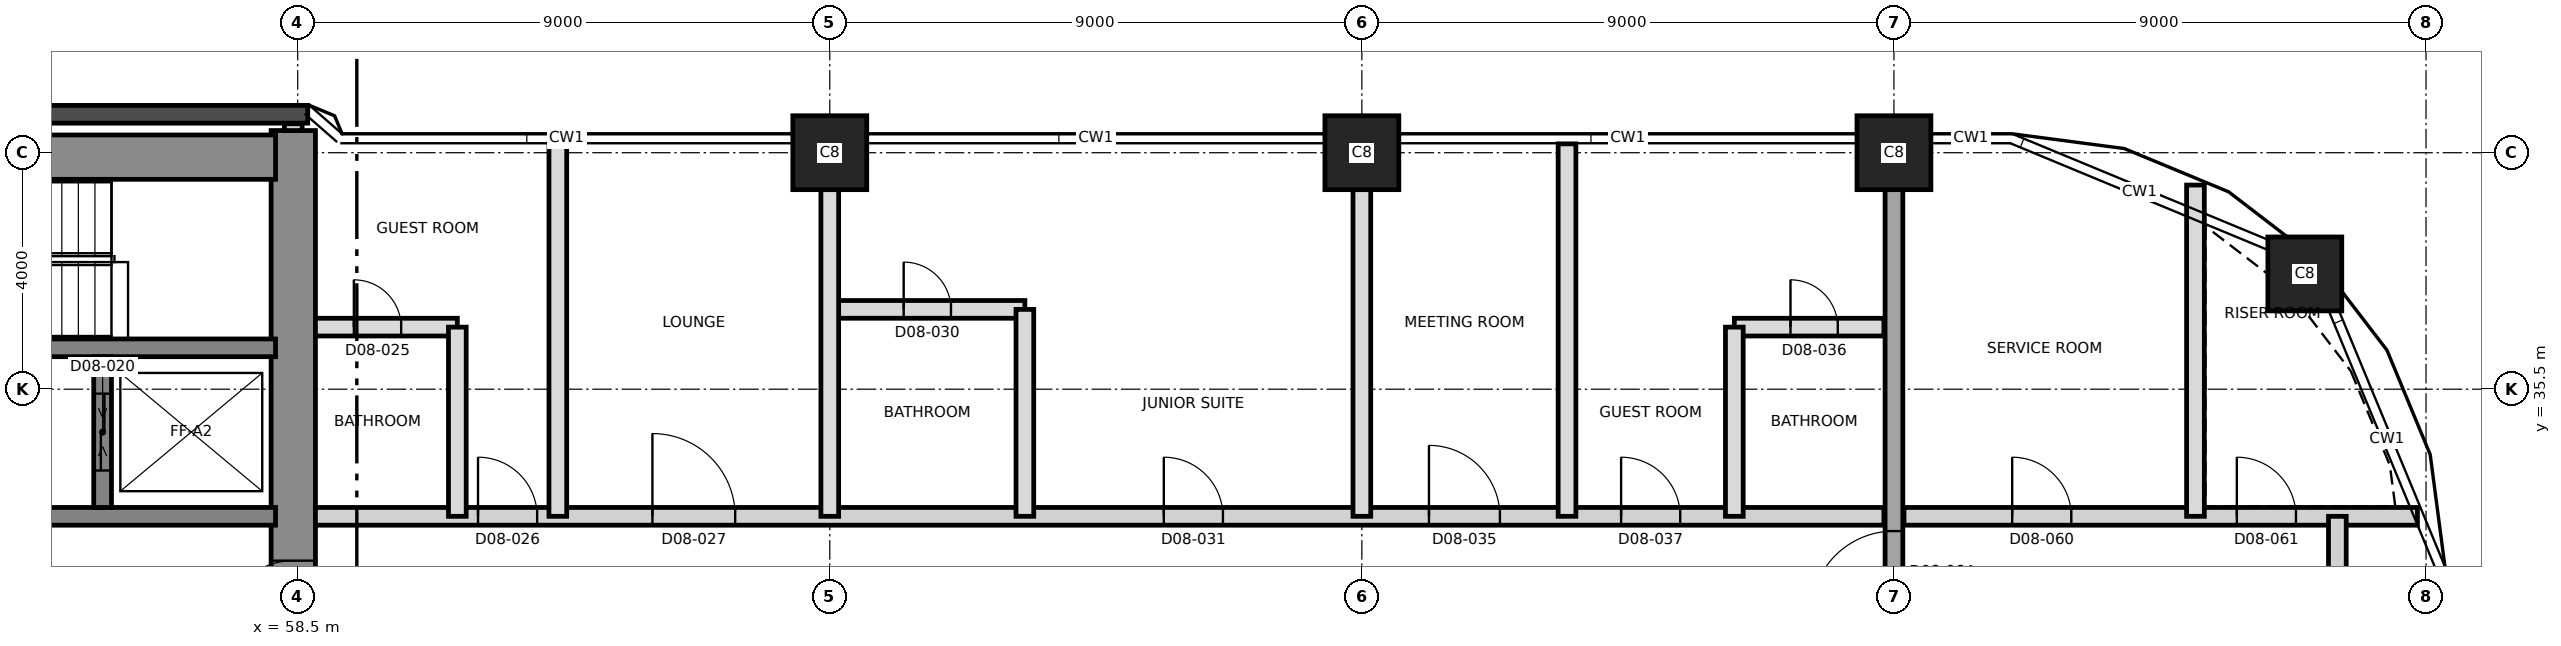
"""IFC4 building model, lengths in metres.
Left out: names, types, materials, properties, quantities, classifications, styles, units other than length and angle.
Written with IfcOpenShell. Run it as: python <this file> out.ifc"""

import sys

from ifc_helpers import new_model, si_unit, direction, frame, frame_2d, origin, origin_2d, place, context, subcontext, project, spatial, rectangle, extrude, element, fill, save


model = new_model("IFC4")
c1 = context("Model", 3, precision=1e-05, world=origin(), true_north=direction((0.0, 1.0)))
c2 = subcontext(c1, "Body", "Model", "MODEL_VIEW")
j1 = project(units=[si_unit("LENGTHUNIT", "METRE"), si_unit("PLANEANGLEUNIT", "RADIAN")], contexts=[c1])
p1 = place(None, origin())
s1 = spatial("IfcSite", under=j1, at=p1, CompositionType="ELEMENT")
p2 = place(p1, origin())
s2 = spatial("IfcBuilding", under=s1, at=p2, CompositionType="ELEMENT")
p3 = place(p2, frame((0.0, 0.0, 98.2)))
s3 = spatial("IfcBuildingStorey", under=s2, at=p3, CompositionType="ELEMENT", Elevation=98.2)
p4 = place(p3, frame((58.425, 21.125, 0.0), z_axis=(0.0, 0.0, 1.0), x_axis=(0.0, 1.0, 0.0)))
e1 = element("IfcWall", 1, at=p4, inside=s3, PredefinedType="SHEAR", context=c2, shape_type="SweptSolid", body=[
    extrude(rectangle(XDim=18.75, YDim=0.75, at=frame_2d((9.375, 0.0))), origin(), (0.0, 0.0, 1.0), 3.7),
])
p5 = place(p4, frame((10.275, 0.0, 0.0)))
e2 = element("IfcOpeningElement", 2, at=p5, cuts=e1, PredefinedType="OPENING", context=c2, shape_type="SweptSolid", body=[
    extrude(rectangle(XDim=1.2, YDim=2.1, at=frame_2d((0.6, 1.05))), frame((0.0, 0.385, 0.0), z_axis=(0.0, -1.0, 0.0), x_axis=(1.0, 0.0, 0.0)), (0.0, 0.0, 1.0), 0.77),
])
p6 = place(p3, frame((31.125, 39.425, 0.0), z_axis=(0.0, 0.0, 1.0), x_axis=(1.0, 0.0, 0.0)))
e3 = element("IfcWall", 3, at=p6, inside=s3, PredefinedType="SHEAR", context=c2, shape_type="SweptSolid", body=[
    extrude(rectangle(XDim=27.0, YDim=0.75, at=frame_2d((13.5, 0.0))), origin(), (0.0, 0.0, 1.0), 3.7),
])
p7 = place(p6, frame((10.575, 0.0, 0.0)))
e4 = element("IfcOpeningElement", 4, at=p7, cuts=e3, PredefinedType="OPENING", context=c2, shape_type="SweptSolid", body=[
    extrude(rectangle(XDim=1.2, YDim=2.1, at=frame_2d((0.6, 1.05))), frame((0.0, 0.385, 0.0), z_axis=(0.0, -1.0, 0.0), x_axis=(1.0, 0.0, 0.0)), (0.0, 0.0, 1.0), 0.77),
])
p8 = place(p3, frame((31.875, 33.35, 0.0), z_axis=(0.0, 0.0, 1.0), x_axis=(1.0, 0.0, 0.0)))
e5 = element("IfcWall", 5, at=p8, inside=s3, PredefinedType="SHEAR", context=c2, shape_type="SweptSolid", body=[
    extrude(rectangle(XDim=26.25, YDim=0.3, at=frame_2d((13.125, 0.0))), origin(), (0.0, 0.0, 1.0), 3.7),
])
p9 = place(p8, frame((13.775, 0.0, 0.0)))
e6 = element("IfcOpeningElement", 6, at=p9, cuts=e5, PredefinedType="OPENING", context=c2, shape_type="SweptSolid", body=[
    extrude(rectangle(XDim=1.4, YDim=2.1, at=frame_2d((0.7, 1.05))), frame((0.0, 0.16, 0.0), z_axis=(0.0, -1.0, 0.0), x_axis=(1.0, 0.0, 0.0)), (0.0, 0.0, 1.0), 0.32),
])
p10 = place(p8, frame((5.25, 0.0, 0.0)))
e7 = element("IfcOpeningElement", 7, at=p10, cuts=e5, PredefinedType="OPENING", context=c2, shape_type="SweptSolid", body=[
    extrude(rectangle(XDim=1.2, YDim=2.1, at=frame_2d((0.6, 1.05))), frame((0.0, 0.16, 0.0), z_axis=(0.0, -1.0, 0.0), x_axis=(1.0, 0.0, 0.0)), (0.0, 0.0, 1.0), 0.32),
])
p11 = place(p8, frame((19.8, 0.0, 0.0)))
e8 = element("IfcOpeningElement", 8, at=p11, cuts=e5, PredefinedType="OPENING", context=c2, shape_type="SweptSolid", body=[
    extrude(rectangle(XDim=1.2, YDim=2.1, at=frame_2d((0.6, 1.05))), frame((0.0, 0.16, 0.0), z_axis=(0.0, -1.0, 0.0), x_axis=(1.0, 0.0, 0.0)), (0.0, 0.0, 1.0), 0.32),
])
p12 = place(p3, frame((43.5, 36.2, 0.0), z_axis=(0.0, 0.0, 1.0), x_axis=(1.0, 0.0, 0.0)))
e9 = element("IfcWall", 9, at=p12, inside=s3, PredefinedType="SHEAR", context=c2, shape_type="SweptSolid", body=[
    extrude(rectangle(XDim=14.625, YDim=0.3, at=frame_2d((7.312, 0.0))), origin(), (0.0, 0.0, 1.0), 3.7),
])
p13 = place(p12, frame((6.9, 0.0, 0.0)))
e10 = element("IfcOpeningElement", 10, at=p13, cuts=e9, PredefinedType="OPENING", context=c2, shape_type="SweptSolid", body=[
    extrude(rectangle(XDim=1.2, YDim=2.1, at=frame_2d((0.6, 1.05))), frame((0.0, 0.16, 0.0), z_axis=(0.0, -1.0, 0.0), x_axis=(1.0, 0.0, 0.0)), (0.0, 0.0, 1.0), 0.32),
])
p14 = place(p12, frame((0.7, 0.0, 0.0)))
e11 = element("IfcOpeningElement", 11, at=p14, cuts=e9, PredefinedType="OPENING", context=c2, shape_type="SweptSolid", body=[
    extrude(rectangle(XDim=1.3, YDim=2.4, at=frame_2d((0.65, 1.2))), frame((0.0, 0.16, 0.0), z_axis=(0.0, -1.0, 0.0), x_axis=(1.0, 0.0, 0.0)), (0.0, 0.0, 1.0), 0.32),
])
p15 = place(p12, frame((3.7, 0.0, 0.0)))
e12 = element("IfcOpeningElement", 12, at=p15, cuts=e9, PredefinedType="OPENING", context=c2, shape_type="SweptSolid", body=[
    extrude(rectangle(XDim=1.3, YDim=2.4, at=frame_2d((0.65, 1.2))), frame((0.0, 0.16, 0.0), z_axis=(0.0, -1.0, 0.0), x_axis=(1.0, 0.0, 0.0)), (0.0, 0.0, 1.0), 0.32),
])
p16 = place(p3, frame((55.2, 33.5, 0.0), z_axis=(0.0, 0.0, 1.0), x_axis=(0.0, 1.0, 0.0)))
e13 = element("IfcWall", 13, at=p16, inside=s3, PredefinedType="SHEAR", context=c2, shape_type="SweptSolid", body=[
    extrude(rectangle(XDim=2.55, YDim=0.3, at=frame_2d((1.275, 0.0))), origin(), (0.0, 0.0, 1.0), 3.7),
])
p17 = place(p16, frame((0.625, 0.0, 0.0)))
e14 = element("IfcOpeningElement", 14, at=p17, cuts=e13, PredefinedType="OPENING", context=c2, shape_type="SweptSolid", body=[
    extrude(rectangle(XDim=1.3, YDim=2.4, at=frame_2d((0.65, 1.2))), frame((0.0, 0.16, 0.0), z_axis=(0.0, -1.0, 0.0), x_axis=(1.0, 0.0, 0.0)), (0.0, 0.0, 1.0), 0.32),
])
for number, where, z_axis, x_axis in (
    (15, (92.45, 37.45, 0.0), (0.0, 0.0, 1.0), (1.0, 0.0, 0.0)),
    (16, (67.5, 39.5, 0.0), (0.0, 0.0, 1.0), (1.0, 0.0, 0.0)),
    (17, (76.5, 39.5, 0.0), (0.0, 0.0, 1.0), (1.0, 0.0, 0.0)),
    (18, (85.5, 39.5, 0.0), (0.0, 0.0, 1.0), (1.0, 0.0, 0.0)),
):
    element("IfcColumn", number, at=place(p3, frame(where, z_axis=z_axis, x_axis=x_axis)), inside=s3, PredefinedType="COLUMN", context=c2, shape_type="SweptSolid", body=[
        extrude(rectangle(XDim=1.25, YDim=1.25, at=origin_2d()), origin(), (0.0, 0.0, 1.0), 3.7),
    ])
p18 = place(p3, frame((85.5, 21.53, 0.0), z_axis=(0.0, 0.0, 1.0), x_axis=(0.0, 1.0, 0.0)))
e19 = element("IfcWall", 19, at=p18, inside=s3, PredefinedType="SHEAR", context=c2, shape_type="SweptSolid", body=[
    extrude(rectangle(XDim=17.94, YDim=0.3, at=frame_2d((8.97, 0.0))), origin(), (0.0, 0.0, 1.0), 3.7),
])
p19 = place(p18, frame((10.17, 0.0, 0.0)))
e20 = element("IfcOpeningElement", 20, at=p19, cuts=e19, PredefinedType="OPENING", context=c2, shape_type="SweptSolid", body=[
    extrude(rectangle(XDim=1.4, YDim=2.1, at=frame_2d((0.7, 1.05))), frame((0.0, 0.16, 0.0), z_axis=(0.0, -1.0, 0.0), x_axis=(1.0, 0.0, 0.0)), (0.0, 0.0, 1.0), 0.32),
])
p20 = place(p3, frame((58.67, 40.15, 0.0), z_axis=(0.0, 0.0, 1.0), x_axis=(-1.0, 0.0, 0.0)))
e21 = element("IfcWall", 21, at=p20, inside=s3, PredefinedType="SOLIDWALL", context=c2, shape_type="SweptSolid", body=[
    extrude(rectangle(XDim=5.341, YDim=0.3, at=frame_2d((2.67, 0.0))), origin(), (0.0, 0.0, 1.0), 3.4),
])
p21 = place(p3, frame((58.8, 33.35, 0.0), z_axis=(0.0, 0.0, 1.0), x_axis=(1.0, 0.0, 0.0)))
e22 = element("IfcWall", 22, at=p21, inside=s3, PredefinedType="PARTITIONING", context=c2, shape_type="SweptSolid", body=[
    extrude(rectangle(XDim=26.53, YDim=0.3, at=frame_2d((13.265, 0.0))), origin(), (0.0, 0.0, 1.0), 3.4),
])
p22 = place(p21, frame((2.75, 0.0, 0.0)))
e23 = element("IfcOpeningElement", 23, at=p22, cuts=e22, PredefinedType="OPENING", context=c2, shape_type="SweptSolid", body=[
    extrude(rectangle(XDim=1.0, YDim=2.1, at=frame_2d((0.5, 1.05))), frame((0.0, 0.16, 0.0), z_axis=(0.0, -1.0, 0.0), x_axis=(1.0, 0.0, 0.0)), (0.0, 0.0, 1.0), 0.32),
])
p23 = place(p21, frame((5.7, 0.0, 0.0)))
e24 = element("IfcOpeningElement", 24, at=p23, cuts=e22, PredefinedType="OPENING", context=c2, shape_type="SweptSolid", body=[
    extrude(rectangle(XDim=1.4, YDim=2.1, at=frame_2d((0.7, 1.05))), frame((0.0, 0.16, 0.0), z_axis=(0.0, -1.0, 0.0), x_axis=(1.0, 0.0, 0.0)), (0.0, 0.0, 1.0), 0.32),
])
p24 = place(p21, frame((14.35, 0.0, 0.0)))
e25 = element("IfcOpeningElement", 25, at=p24, cuts=e22, PredefinedType="OPENING", context=c2, shape_type="SweptSolid", body=[
    extrude(rectangle(XDim=1.0, YDim=2.4, at=frame_2d((0.5, 1.2))), frame((0.0, 0.16, 0.0), z_axis=(0.0, -1.0, 0.0), x_axis=(1.0, 0.0, 0.0)), (0.0, 0.0, 1.0), 0.32),
])
p25 = place(p21, frame((18.835, 0.0, 0.0)))
e26 = element("IfcOpeningElement", 26, at=p25, cuts=e22, PredefinedType="OPENING", context=c2, shape_type="SweptSolid", body=[
    extrude(rectangle(XDim=1.2, YDim=2.1, at=frame_2d((0.6, 1.05))), frame((0.0, 0.16, 0.0), z_axis=(0.0, -1.0, 0.0), x_axis=(1.0, 0.0, 0.0)), (0.0, 0.0, 1.0), 0.32),
])
p26 = place(p21, frame((22.085, 0.0, 0.0)))
e27 = element("IfcOpeningElement", 27, at=p26, cuts=e22, PredefinedType="OPENING", context=c2, shape_type="SweptSolid", body=[
    extrude(rectangle(XDim=1.0, YDim=2.1, at=frame_2d((0.5, 1.05))), frame((0.0, 0.16, 0.0), z_axis=(0.0, -1.0, 0.0), x_axis=(1.0, 0.0, 0.0)), (0.0, 0.0, 1.0), 0.32),
])
p27 = place(p3, frame((85.67, 33.35, 0.0), z_axis=(0.0, 0.0, 1.0), x_axis=(1.0, 0.0, 0.0)))
e28 = element("IfcWall", 28, at=p27, inside=s3, PredefinedType="PARTITIONING", context=c2, shape_type="SweptSolid", body=[
    extrude(rectangle(XDim=8.685, YDim=0.3, at=frame_2d((4.343, 0.0))), origin(), (0.0, 0.0, 1.0), 3.4),
])
p28 = place(p27, frame((1.83, 0.0, 0.0)))
e29 = element("IfcOpeningElement", 29, at=p28, cuts=e28, PredefinedType="OPENING", context=c2, shape_type="SweptSolid", body=[
    extrude(rectangle(XDim=1.0, YDim=2.1, at=frame_2d((0.5, 1.05))), frame((0.0, 0.16, 0.0), z_axis=(0.0, -1.0, 0.0), x_axis=(1.0, 0.0, 0.0)), (0.0, 0.0, 1.0), 0.32),
])
p29 = place(p27, frame((5.63, 0.0, 0.0)))
e30 = element("IfcOpeningElement", 30, at=p29, cuts=e28, PredefinedType="OPENING", context=c2, shape_type="SweptSolid", body=[
    extrude(rectangle(XDim=1.0, YDim=2.1, at=frame_2d((0.5, 1.05))), frame((0.0, 0.16, 0.0), z_axis=(0.0, -1.0, 0.0), x_axis=(1.0, 0.0, 0.0)), (0.0, 0.0, 1.0), 0.32),
])
p30 = place(p3, frame((58.8, 36.55, 0.0), z_axis=(0.0, 0.0, 1.0), x_axis=(1.0, 0.0, 0.0)))
e31 = element("IfcWall", 31, at=p30, inside=s3, PredefinedType="PARTITIONING", context=c2, shape_type="SweptSolid", body=[
    extrude(rectangle(XDim=2.4, YDim=0.3, at=frame_2d((1.2, 0.0))), origin(), (0.0, 0.0, 1.0), 3.4),
])
p31 = place(p30, frame((0.65, 0.0, 0.0)))
e32 = element("IfcOpeningElement", 32, at=p31, cuts=e31, PredefinedType="OPENING", context=c2, shape_type="SweptSolid", body=[
    extrude(rectangle(XDim=0.8, YDim=2.1, at=frame_2d((0.4, 1.05))), frame((0.0, 0.16, 0.0), z_axis=(0.0, -1.0, 0.0), x_axis=(1.0, 0.0, 0.0)), (0.0, 0.0, 1.0), 0.32),
])
p32 = place(p3, frame((82.8, 36.55, 0.0), z_axis=(0.0, 0.0, 1.0), x_axis=(1.0, 0.0, 0.0)))
e33 = element("IfcWall", 33, at=p32, inside=s3, PredefinedType="PARTITIONING", context=c2, shape_type="SweptSolid", body=[
    extrude(rectangle(XDim=2.53, YDim=0.3, at=frame_2d((1.265, 0.0))), origin(), (0.0, 0.0, 1.0), 3.4),
])
p33 = place(p32, frame((0.95, 0.0, 0.0)))
e34 = element("IfcOpeningElement", 34, at=p33, cuts=e33, PredefinedType="OPENING", context=c2, shape_type="SweptSolid", body=[
    extrude(rectangle(XDim=0.8, YDim=2.1, at=frame_2d((0.4, 1.05))), frame((0.0, 0.16, 0.0), z_axis=(0.0, -1.0, 0.0), x_axis=(1.0, 0.0, 0.0)), (0.0, 0.0, 1.0), 0.32),
])
p34 = place(p3, frame((67.5, 36.85, 0.0), z_axis=(0.0, 0.0, 1.0), x_axis=(1.0, 0.0, 0.0)))
e35 = element("IfcWall", 35, at=p34, inside=s3, PredefinedType="PARTITIONING", context=c2, shape_type="SweptSolid", body=[
    extrude(rectangle(XDim=3.3, YDim=0.3, at=frame_2d((1.65, 0.0))), origin(), (0.0, 0.0, 1.0), 3.4),
])
p35 = place(p34, frame((1.25, 0.0, 0.0)))
e36 = element("IfcOpeningElement", 36, at=p35, cuts=e35, PredefinedType="OPENING", context=c2, shape_type="SweptSolid", body=[
    extrude(rectangle(XDim=0.8, YDim=2.1, at=frame_2d((0.4, 1.05))), frame((0.0, 0.16, 0.0), z_axis=(0.0, -1.0, 0.0), x_axis=(1.0, 0.0, 0.0)), (0.0, 0.0, 1.0), 0.32),
])
p36 = place(p3, frame((61.2, 33.35, 0.0), z_axis=(0.0, 0.0, 1.0), x_axis=(0.0, 1.0, 0.0)))
e37 = element("IfcWall", 37, at=p36, inside=s3, PredefinedType="PARTITIONING", context=c2, shape_type="SweptSolid", body=[
    extrude(rectangle(XDim=3.2, YDim=0.3, at=frame_2d((1.6, 0.0))), origin(), (0.0, 0.0, 1.0), 3.4),
])
p37 = place(p3, frame((62.9, 33.35, 0.0), z_axis=(0.0, 0.0, 1.0), x_axis=(0.0, 1.0, 0.0)))
e38 = element("IfcWall", 38, at=p37, inside=s3, PredefinedType="PARTITIONING", context=c2, shape_type="SweptSolid", body=[
    extrude(rectangle(XDim=6.3, YDim=0.3, at=frame_2d((3.15, 0.0))), origin(), (0.0, 0.0, 1.0), 3.4),
])
p38 = place(p3, frame((67.5, 33.35, 0.0), z_axis=(0.0, 0.0, 1.0), x_axis=(0.0, 1.0, 0.0)))
e39 = element("IfcWall", 39, at=p38, inside=s3, PredefinedType="PARTITIONING", context=c2, shape_type="SweptSolid", body=[
    extrude(rectangle(XDim=6.12, YDim=0.3, at=frame_2d((3.06, 0.0))), origin(), (0.0, 0.0, 1.0), 3.4),
])
p39 = place(p3, frame((70.8, 33.35, 0.0), z_axis=(0.0, 0.0, 1.0), x_axis=(0.0, 1.0, 0.0)))
e40 = element("IfcWall", 40, at=p39, inside=s3, PredefinedType="PARTITIONING", context=c2, shape_type="SweptSolid", body=[
    extrude(rectangle(XDim=3.5, YDim=0.3, at=frame_2d((1.75, 0.0))), origin(), (0.0, 0.0, 1.0), 3.4),
])
p40 = place(p3, frame((76.5, 33.35, 0.0), z_axis=(0.0, 0.0, 1.0), x_axis=(0.0, 1.0, 0.0)))
e41 = element("IfcWall", 41, at=p40, inside=s3, PredefinedType="PARTITIONING", context=c2, shape_type="SweptSolid", body=[
    extrude(rectangle(XDim=6.12, YDim=0.3, at=frame_2d((3.06, 0.0))), origin(), (0.0, 0.0, 1.0), 3.4),
])
p41 = place(p3, frame((79.97, 33.35, 0.0), z_axis=(0.0, 0.0, 1.0), x_axis=(0.0, 1.0, 0.0)))
e42 = element("IfcWall", 42, at=p41, inside=s3, PredefinedType="PARTITIONING", context=c2, shape_type="SweptSolid", body=[
    extrude(rectangle(XDim=6.3, YDim=0.3, at=frame_2d((3.15, 0.0))), origin(), (0.0, 0.0, 1.0), 3.4),
])
p42 = place(p3, frame((82.8, 33.35, 0.0), z_axis=(0.0, 0.0, 1.0), x_axis=(0.0, 1.0, 0.0)))
e43 = element("IfcWall", 43, at=p42, inside=s3, PredefinedType="PARTITIONING", context=c2, shape_type="SweptSolid", body=[
    extrude(rectangle(XDim=3.2, YDim=0.3, at=frame_2d((1.6, 0.0))), origin(), (0.0, 0.0, 1.0), 3.4),
])
p43 = place(p3, frame((90.6, 33.35, 0.0), z_axis=(0.0, 0.0, 1.0), x_axis=(0.0, 1.0, 0.0)))
e44 = element("IfcWall", 44, at=p43, inside=s3, PredefinedType="PARTITIONING", context=c2, shape_type="SweptSolid", body=[
    extrude(rectangle(XDim=5.603, YDim=0.3, at=frame_2d((2.801, 0.0))), origin(), (0.0, 0.0, 1.0), 3.4),
])
p44 = place(p3, frame((93.0, 30.65, 0.0), z_axis=(0.0, 0.0, 1.0), x_axis=(0.0, 1.0, 0.0)))
e45 = element("IfcWall", 45, at=p44, inside=s3, PredefinedType="PARTITIONING", context=c2, shape_type="SweptSolid", body=[
    extrude(rectangle(XDim=2.7, YDim=0.3, at=frame_2d((1.35, 0.0))), origin(), (0.0, 0.0, 1.0), 3.4),
])
p45 = place(p3, frame((58.425, 39.875, 0.0), z_axis=(0.0, 0.0, 1.0), x_axis=(0.0, 1.0, 0.0)))
e46 = element("IfcWall", 46, at=p45, inside=s3, PredefinedType="PARTITIONING", context=c2, shape_type="SweptSolid", body=[
    extrude(rectangle(XDim=0.115, YDim=0.3, at=frame_2d((0.058, 0.0))), origin(), (0.0, 0.0, 1.0), 3.4),
])
p46 = place(p5, origin())
e47 = element("IfcDoor", 47, at=p46, inside=s3, OperationType="SINGLE_SWING_LEFT", PredefinedType="DOOR", context=c2, shape_type="SweptSolid", body=[
    extrude(rectangle(XDim=1.2, YDim=2.1, at=frame_2d((0.6, 1.05))), frame((0.0, 0.025, 0.0), z_axis=(0.0, -1.0, 0.0), x_axis=(1.0, 0.0, 0.0)), (0.0, 0.0, 1.0), 0.05),
])
fill(e2, e47)
p47 = place(p17, origin())
e48 = element("IfcDoor", 48, at=p47, inside=s3, OperationType="SLIDING_TO_LEFT", PredefinedType="DOOR", context=c2, shape_type="SweptSolid", body=[
    extrude(rectangle(XDim=1.3, YDim=2.4, at=frame_2d((0.65, 1.2))), frame((0.0, 0.025, 0.0), z_axis=(0.0, -1.0, 0.0), x_axis=(1.0, 0.0, 0.0)), (0.0, 0.0, 1.0), 0.05),
])
fill(e14, e48)
p48 = place(p31, origin())
e49 = element("IfcDoor", 49, at=p48, inside=s3, OperationType="SINGLE_SWING_LEFT", PredefinedType="DOOR", context=c2, shape_type="SweptSolid", body=[
    extrude(rectangle(XDim=0.8, YDim=2.1, at=frame_2d((0.4, 1.05))), frame((0.0, 0.025, 0.0), z_axis=(0.0, -1.0, 0.0), x_axis=(1.0, 0.0, 0.0)), (0.0, 0.0, 1.0), 0.05),
])
fill(e32, e49)
p49 = place(p22, origin())
e50 = element("IfcDoor", 50, at=p49, inside=s3, OperationType="SINGLE_SWING_LEFT", PredefinedType="DOOR", context=c2, shape_type="SweptSolid", body=[
    extrude(rectangle(XDim=1.0, YDim=2.1, at=frame_2d((0.5, 1.05))), frame((0.0, 0.025, 0.0), z_axis=(0.0, -1.0, 0.0), x_axis=(1.0, 0.0, 0.0)), (0.0, 0.0, 1.0), 0.05),
])
fill(e23, e50)
p50 = place(p23, origin())
e51 = element("IfcDoor", 51, at=p50, inside=s3, OperationType="SINGLE_SWING_RIGHT", PredefinedType="DOOR", context=c2, shape_type="SweptSolid", body=[
    extrude(rectangle(XDim=1.4, YDim=2.1, at=frame_2d((0.7, 1.05))), frame((0.0, 0.025, 0.0), z_axis=(0.0, -1.0, 0.0), x_axis=(1.0, 0.0, 0.0)), (0.0, 0.0, 1.0), 0.05),
])
fill(e24, e51)
p51 = place(p35, origin())
e52 = element("IfcDoor", 52, at=p51, inside=s3, OperationType="SINGLE_SWING_LEFT", PredefinedType="DOOR", context=c2, shape_type="SweptSolid", body=[
    extrude(rectangle(XDim=0.8, YDim=2.1, at=frame_2d((0.4, 1.05))), frame((0.0, 0.025, 0.0), z_axis=(0.0, -1.0, 0.0), x_axis=(1.0, 0.0, 0.0)), (0.0, 0.0, 1.0), 0.05),
])
fill(e36, e52)
p52 = place(p24, origin())
e53 = element("IfcDoor", 53, at=p52, inside=s3, OperationType="SINGLE_SWING_RIGHT", PredefinedType="DOOR", context=c2, shape_type="SweptSolid", body=[
    extrude(rectangle(XDim=1.0, YDim=2.4, at=frame_2d((0.5, 1.2))), frame((0.0, 0.025, 0.0), z_axis=(0.0, -1.0, 0.0), x_axis=(1.0, 0.0, 0.0)), (0.0, 0.0, 1.0), 0.05),
])
fill(e25, e53)
p53 = place(p25, origin())
e54 = element("IfcDoor", 54, at=p53, inside=s3, OperationType="SINGLE_SWING_LEFT", PredefinedType="DOOR", context=c2, shape_type="SweptSolid", body=[
    extrude(rectangle(XDim=1.2, YDim=2.1, at=frame_2d((0.6, 1.05))), frame((0.0, 0.025, 0.0), z_axis=(0.0, -1.0, 0.0), x_axis=(1.0, 0.0, 0.0)), (0.0, 0.0, 1.0), 0.05),
])
fill(e26, e54)
p54 = place(p33, origin())
e55 = element("IfcDoor", 55, at=p54, inside=s3, OperationType="SINGLE_SWING_LEFT", PredefinedType="DOOR", context=c2, shape_type="SweptSolid", body=[
    extrude(rectangle(XDim=0.8, YDim=2.1, at=frame_2d((0.4, 1.05))), frame((0.0, 0.025, 0.0), z_axis=(0.0, -1.0, 0.0), x_axis=(1.0, 0.0, 0.0)), (0.0, 0.0, 1.0), 0.05),
])
fill(e34, e55)
p55 = place(p26, origin())
e56 = element("IfcDoor", 56, at=p55, inside=s3, OperationType="SINGLE_SWING_RIGHT", PredefinedType="DOOR", context=c2, shape_type="SweptSolid", body=[
    extrude(rectangle(XDim=1.0, YDim=2.1, at=frame_2d((0.5, 1.05))), frame((0.0, 0.025, 0.0), z_axis=(0.0, -1.0, 0.0), x_axis=(1.0, 0.0, 0.0)), (0.0, 0.0, 1.0), 0.05),
])
fill(e27, e56)
p56 = place(p28, origin())
e57 = element("IfcDoor", 57, at=p56, inside=s3, OperationType="SINGLE_SWING_LEFT", PredefinedType="DOOR", context=c2, shape_type="SweptSolid", body=[
    extrude(rectangle(XDim=1.0, YDim=2.1, at=frame_2d((0.5, 1.05))), frame((0.0, 0.025, 0.0), z_axis=(0.0, -1.0, 0.0), x_axis=(1.0, 0.0, 0.0)), (0.0, 0.0, 1.0), 0.05),
])
fill(e29, e57)
p57 = place(p29, origin())
e58 = element("IfcDoor", 58, at=p57, inside=s3, OperationType="SINGLE_SWING_RIGHT", PredefinedType="DOOR", context=c2, shape_type="SweptSolid", body=[
    extrude(rectangle(XDim=1.0, YDim=2.1, at=frame_2d((0.5, 1.05))), frame((0.0, 0.025, 0.0), z_axis=(0.0, -1.0, 0.0), x_axis=(1.0, 0.0, 0.0)), (0.0, 0.0, 1.0), 0.05),
])
fill(e30, e58)
p58 = place(p19, origin())
e59 = element("IfcDoor", 59, at=p58, inside=s3, OperationType="SINGLE_SWING_RIGHT", PredefinedType="DOOR", context=c2, shape_type="SweptSolid", body=[
    extrude(rectangle(XDim=1.4, YDim=2.1, at=frame_2d((0.7, 1.05))), frame((0.0, 0.025, 0.0), z_axis=(0.0, -1.0, 0.0), x_axis=(1.0, 0.0, 0.0)), (0.0, 0.0, 1.0), 0.05),
])
fill(e20, e59)
save(model, sys.argv[1])
